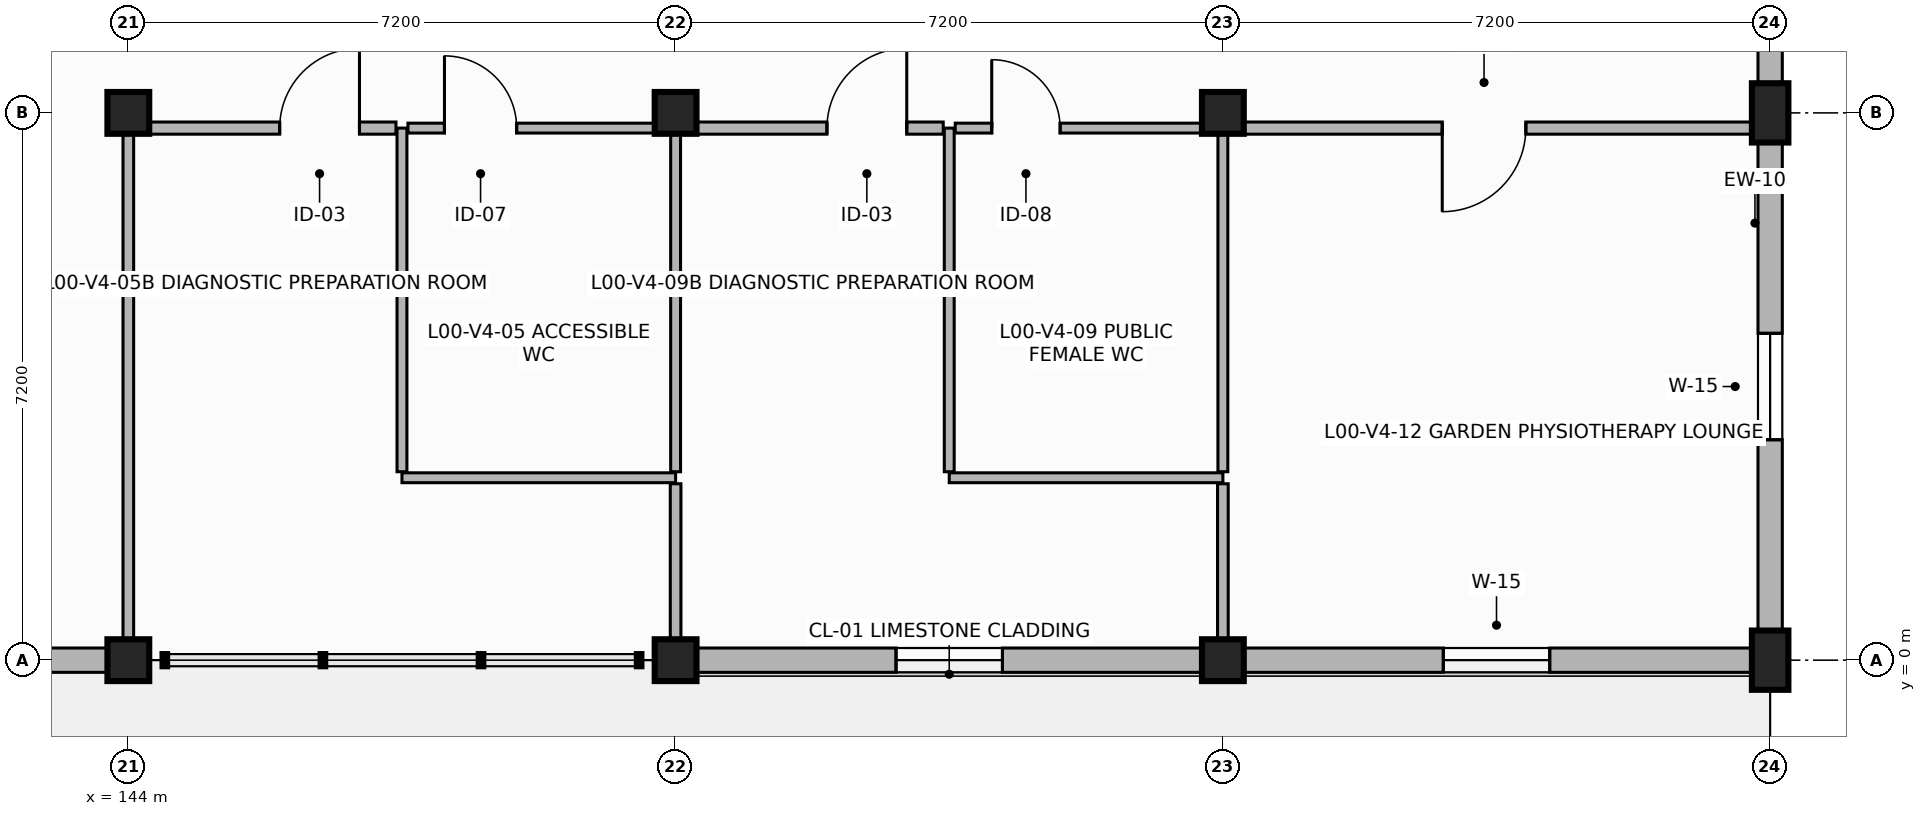
"""IFC4 building model, lengths in metres.
Left out: names, types, materials, properties, quantities, classifications, styles, units other than length and angle.
Written with IfcOpenShell. Run it as: python <this file> out.ifc"""

import sys

from ifc_helpers import new_model, si_unit, direction, frame, frame_2d, origin, origin_2d, place, context, subcontext, project, spatial, rectangle, extrude, element, fill, save


model = new_model("IFC4")
c1 = context("Model", 3, precision=1e-05, world=origin(), true_north=direction((0.0, 1.0)))
c2 = subcontext(c1, "Body", "Model", "MODEL_VIEW")
j1 = project(units=[si_unit("LENGTHUNIT", "METRE"), si_unit("PLANEANGLEUNIT", "RADIAN")], contexts=[c1])
p1 = place(None, origin())
s1 = spatial("IfcSite", under=j1, at=p1, CompositionType="ELEMENT")
p2 = place(p1, origin())
s2 = spatial("IfcBuilding", under=s1, at=p2, CompositionType="ELEMENT")
p3 = place(p2, origin())
s3 = spatial("IfcBuildingStorey", under=s2, at=p3, CompositionType="ELEMENT", Elevation=0.0)
for number, where, z_axis, x_axis in (
    (1, (144.0, 0.0, -0.35), (0.0, 0.0, 1.0), (1.0, 0.0, 0.0)),
    (2, (144.0, 7.2, -0.35), (0.0, 0.0, 1.0), (1.0, 0.0, 0.0)),
    (3, (151.2, 0.0, -0.35), (0.0, 0.0, 1.0), (1.0, 0.0, 0.0)),
    (4, (151.2, 7.2, -0.35), (0.0, 0.0, 1.0), (1.0, 0.0, 0.0)),
    (5, (158.4, 0.0, -0.35), (0.0, 0.0, 1.0), (1.0, 0.0, 0.0)),
    (6, (158.4, 7.2, -0.35), (0.0, 0.0, 1.0), (1.0, 0.0, 0.0)),
):
    element("IfcColumn", number, at=place(p3, frame(where, z_axis=z_axis, x_axis=x_axis)), inside=s3, PredefinedType="COLUMN", context=c2, shape_type="SweptSolid", body=[
        extrude(rectangle(XDim=0.55, YDim=0.55, at=origin_2d()), origin(), (0.0, 0.0, 1.0), 4.59),
    ])
for number, where, z_axis, x_axis in (
    (7, (165.6, 0.0, -0.35), (0.0, 0.0, 1.0), (1.0, 0.0, 0.0)),
    (8, (165.6, 7.2, -0.35), (0.0, 0.0, 1.0), (1.0, 0.0, 0.0)),
):
    element("IfcColumn", number, at=place(p3, frame(where, z_axis=z_axis, x_axis=x_axis)), inside=s3, PredefinedType="PILASTER", context=c2, shape_type="SweptSolid", body=[
        extrude(rectangle(XDim=0.48, YDim=0.78, at=origin_2d()), origin(), (0.0, 0.0, 1.0), 4.59),
    ])
p4 = place(p3, frame((136.8, 0.0, 0.0), z_axis=(0.0, 0.0, 1.0), x_axis=(1.0, 0.0, 0.0)))
e9 = element("IfcWall", 9, at=p4, inside=s3, PredefinedType="SOLIDWALL", context=c2, shape_type="SweptSolid", body=[
    extrude(rectangle(XDim=7.2, YDim=0.32, at=frame_2d((3.6, 0.0))), origin(), (0.0, 0.0, 1.0), 3.62),
])
p5 = place(p4, frame((2.5, 0.0, 0.0)))
e10 = element("IfcOpeningElement", 10, at=p5, cuts=e9, PredefinedType="OPENING", context=c2, shape_type="SweptSolid", body=[
    extrude(rectangle(XDim=2.2, YDim=2.6, at=frame_2d((1.1, 1.3))), frame((0.0, 0.17, 0.0), z_axis=(0.0, -1.0, 0.0), x_axis=(1.0, 0.0, 0.0)), (0.0, 0.0, 1.0), 0.34),
])
p6 = place(p3, frame((151.2, 0.0, 0.0), z_axis=(0.0, 0.0, 1.0), x_axis=(1.0, 0.0, 0.0)))
e11 = element("IfcWall", 11, at=p6, inside=s3, PredefinedType="SOLIDWALL", context=c2, shape_type="SweptSolid", body=[
    extrude(rectangle(XDim=7.2, YDim=0.32, at=frame_2d((3.6, 0.0))), origin(), (0.0, 0.0, 1.0), 3.62),
])
p7 = place(p6, frame((2.9, 0.0, 0.85)))
e12 = element("IfcOpeningElement", 12, at=p7, cuts=e11, PredefinedType="OPENING", context=c2, shape_type="SweptSolid", body=[
    extrude(rectangle(XDim=1.4, YDim=2.2, at=frame_2d((0.7, 1.1))), frame((0.0, 0.17, 0.0), z_axis=(0.0, -1.0, 0.0), x_axis=(1.0, 0.0, 0.0)), (0.0, 0.0, 1.0), 0.34),
])
p8 = place(p3, frame((158.4, 0.0, 0.0), z_axis=(0.0, 0.0, 1.0), x_axis=(1.0, 0.0, 0.0)))
e13 = element("IfcWall", 13, at=p8, inside=s3, PredefinedType="SOLIDWALL", context=c2, shape_type="SweptSolid", body=[
    extrude(rectangle(XDim=7.2, YDim=0.32, at=frame_2d((3.6, 0.0))), origin(), (0.0, 0.0, 1.0), 3.62),
])
p9 = place(p8, frame((2.9, 0.0, 0.85)))
e14 = element("IfcOpeningElement", 14, at=p9, cuts=e13, PredefinedType="OPENING", context=c2, shape_type="SweptSolid", body=[
    extrude(rectangle(XDim=1.4, YDim=2.2, at=frame_2d((0.7, 1.1))), frame((0.0, 0.17, 0.0), z_axis=(0.0, -1.0, 0.0), x_axis=(1.0, 0.0, 0.0)), (0.0, 0.0, 1.0), 0.34),
])
p10 = place(p3, frame((165.6, 0.0, 0.0), z_axis=(0.0, 0.0, 1.0), x_axis=(0.0, 1.0, 0.0)))
e15 = element("IfcWall", 15, at=p10, inside=s3, PredefinedType="SOLIDWALL", context=c2, shape_type="SweptSolid", body=[
    extrude(rectangle(XDim=7.2, YDim=0.32, at=frame_2d((3.6, 0.0))), origin(), (0.0, 0.0, 1.0), 3.62),
])
p11 = place(p10, frame((2.9, 0.0, 0.85)))
e16 = element("IfcOpeningElement", 16, at=p11, cuts=e15, PredefinedType="OPENING", context=c2, shape_type="SweptSolid", body=[
    extrude(rectangle(XDim=1.4, YDim=2.2, at=frame_2d((0.7, 1.1))), frame((0.0, 0.17, 0.0), z_axis=(0.0, -1.0, 0.0), x_axis=(1.0, 0.0, 0.0)), (0.0, 0.0, 1.0), 0.34),
])
p12 = place(p3, frame((165.6, 7.2, 0.0), z_axis=(0.0, 0.0, 1.0), x_axis=(0.0, 1.0, 0.0)))
e17 = element("IfcWall", 17, at=p12, inside=s3, PredefinedType="SOLIDWALL", context=c2, shape_type="SweptSolid", body=[
    extrude(rectangle(XDim=7.2, YDim=0.32, at=frame_2d((3.6, 0.0))), origin(), (0.0, 0.0, 1.0), 3.62),
])
p13 = place(p12, frame((4.4, 0.0, 0.85)))
e18 = element("IfcOpeningElement", 18, at=p13, cuts=e17, PredefinedType="OPENING", context=c2, shape_type="SweptSolid", body=[
    extrude(rectangle(XDim=1.4, YDim=2.2, at=frame_2d((0.7, 1.1))), frame((0.0, 0.17, 0.0), z_axis=(0.0, -1.0, 0.0), x_axis=(1.0, 0.0, 0.0)), (0.0, 0.0, 1.0), 0.34),
])
p14 = place(p3, frame((151.2, 2.4, 0.0), z_axis=(0.0, 0.0, 1.0), x_axis=(-1.0, 0.0, 0.0)))
e19 = element("IfcWall", 19, at=p14, inside=s3, PredefinedType="PARTITIONING", context=c2, shape_type="SweptSolid", body=[
    extrude(rectangle(XDim=3.6, YDim=0.13, at=frame_2d((1.8, 0.0))), origin(), (0.0, 0.0, 1.0), 3.6),
])
p15 = place(p3, frame((147.6, 2.479, 0.0), z_axis=(0.0, 0.0, 1.0), x_axis=(0.0, 1.0, 0.0)))
e20 = element("IfcWall", 20, at=p15, inside=s3, PredefinedType="PARTITIONING", context=c2, shape_type="SweptSolid", body=[
    extrude(rectangle(XDim=4.521, YDim=0.13, at=frame_2d((2.26, 0.0))), origin(), (0.0, 0.0, 1.0), 3.6),
])
p16 = place(p3, frame((147.679, 7.0, 0.0), z_axis=(0.0, 0.0, 1.0), x_axis=(1.0, 0.0, 0.0)))
e21 = element("IfcWall", 21, at=p16, inside=s3, PredefinedType="PARTITIONING", context=c2, shape_type="SweptSolid", body=[
    extrude(rectangle(XDim=3.521, YDim=0.13, at=frame_2d((1.76, 0.0))), origin(), (0.0, 0.0, 1.0), 3.6),
])
p17 = place(p16, frame((0.48, 0.0, 0.0)))
e22 = element("IfcOpeningElement", 22, at=p17, cuts=e21, PredefinedType="OPENING", context=c2, shape_type="SweptSolid", body=[
    extrude(rectangle(XDim=0.95, YDim=2.1, at=frame_2d((0.475, 1.05))), frame((0.0, 0.075, 0.0), z_axis=(0.0, -1.0, 0.0), x_axis=(1.0, 0.0, 0.0)), (0.0, 0.0, 1.0), 0.15),
])
p18 = place(p3, frame((151.2, 6.921, 0.0), z_axis=(0.0, 0.0, 1.0), x_axis=(0.0, -1.0, 0.0)))
e23 = element("IfcWall", 23, at=p18, inside=s3, PredefinedType="PARTITIONING", context=c2, shape_type="SweptSolid", body=[
    extrude(rectangle(XDim=4.442, YDim=0.13, at=frame_2d((2.221, 0.0))), origin(), (0.0, 0.0, 1.0), 3.6),
])
p19 = place(p3, frame((151.2, 2.321, 0.0), z_axis=(0.0, 0.0, 1.0), x_axis=(0.0, -1.0, 0.0)))
e24 = element("IfcWall", 24, at=p19, inside=s3, PredefinedType="PARTITIONING", context=c2, shape_type="SweptSolid", body=[
    extrude(rectangle(XDim=2.146, YDim=0.14, at=frame_2d((1.073, 0.0))), origin(), (0.0, 0.0, 1.0), 3.6),
])
p20 = place(p3, frame((144.0, 0.175, 0.0), z_axis=(0.0, 0.0, 1.0), x_axis=(0.0, 1.0, 0.0)))
e25 = element("IfcWall", 25, at=p20, inside=s3, PredefinedType="PARTITIONING", context=c2, shape_type="SweptSolid", body=[
    extrude(rectangle(XDim=6.825, YDim=0.14, at=frame_2d((3.413, 0.0))), origin(), (0.0, 0.0, 1.0), 3.6),
])
p21 = place(p3, frame((144.084, 7.0, 0.0), z_axis=(0.0, 0.0, 1.0), x_axis=(1.0, 0.0, 0.0)))
e26 = element("IfcWall", 26, at=p21, inside=s3, PredefinedType="PARTITIONING", context=c2, shape_type="SweptSolid", body=[
    extrude(rectangle(XDim=3.437, YDim=0.16, at=frame_2d((1.719, 0.0))), origin(), (0.0, 0.0, 1.0), 3.6),
])
p22 = place(p21, frame((1.907, 0.0, 0.0)))
e27 = element("IfcOpeningElement", 27, at=p22, cuts=e26, PredefinedType="OPENING", context=c2, shape_type="SweptSolid", body=[
    extrude(rectangle(XDim=1.05, YDim=2.15, at=frame_2d((0.525, 1.075))), frame((0.0, 0.09, 0.0), z_axis=(0.0, -1.0, 0.0), x_axis=(1.0, 0.0, 0.0)), (0.0, 0.0, 1.0), 0.18),
])
p23 = place(p3, frame((158.4, 2.4, 0.0), z_axis=(0.0, 0.0, 1.0), x_axis=(-1.0, 0.0, 0.0)))
e28 = element("IfcWall", 28, at=p23, inside=s3, PredefinedType="PARTITIONING", context=c2, shape_type="SweptSolid", body=[
    extrude(rectangle(XDim=3.6, YDim=0.13, at=frame_2d((1.8, 0.0))), origin(), (0.0, 0.0, 1.0), 3.6),
])
p24 = place(p3, frame((154.8, 2.479, 0.0), z_axis=(0.0, 0.0, 1.0), x_axis=(0.0, 1.0, 0.0)))
e29 = element("IfcWall", 29, at=p24, inside=s3, PredefinedType="PARTITIONING", context=c2, shape_type="SweptSolid", body=[
    extrude(rectangle(XDim=4.521, YDim=0.13, at=frame_2d((2.26, 0.0))), origin(), (0.0, 0.0, 1.0), 3.6),
])
p25 = place(p3, frame((154.879, 7.0, 0.0), z_axis=(0.0, 0.0, 1.0), x_axis=(1.0, 0.0, 0.0)))
e30 = element("IfcWall", 30, at=p25, inside=s3, PredefinedType="PARTITIONING", context=c2, shape_type="SweptSolid", body=[
    extrude(rectangle(XDim=3.521, YDim=0.13, at=frame_2d((1.76, 0.0))), origin(), (0.0, 0.0, 1.0), 3.6),
])
p26 = place(p25, frame((0.48, 0.0, 0.0)))
e31 = element("IfcOpeningElement", 31, at=p26, cuts=e30, PredefinedType="OPENING", context=c2, shape_type="SweptSolid", body=[
    extrude(rectangle(XDim=0.9, YDim=2.1, at=frame_2d((0.45, 1.05))), frame((0.0, 0.075, 0.0), z_axis=(0.0, -1.0, 0.0), x_axis=(1.0, 0.0, 0.0)), (0.0, 0.0, 1.0), 0.15),
])
p27 = place(p3, frame((158.4, 6.921, 0.0), z_axis=(0.0, 0.0, 1.0), x_axis=(0.0, -1.0, 0.0)))
e32 = element("IfcWall", 32, at=p27, inside=s3, PredefinedType="PARTITIONING", context=c2, shape_type="SweptSolid", body=[
    extrude(rectangle(XDim=4.442, YDim=0.13, at=frame_2d((2.221, 0.0))), origin(), (0.0, 0.0, 1.0), 3.6),
])
p28 = place(p3, frame((158.4, 2.321, 0.0), z_axis=(0.0, 0.0, 1.0), x_axis=(0.0, -1.0, 0.0)))
e33 = element("IfcWall", 33, at=p28, inside=s3, PredefinedType="PARTITIONING", context=c2, shape_type="SweptSolid", body=[
    extrude(rectangle(XDim=2.146, YDim=0.14, at=frame_2d((1.073, 0.0))), origin(), (0.0, 0.0, 1.0), 3.6),
])
p29 = place(p3, frame((151.279, 7.0, 0.0), z_axis=(0.0, 0.0, 1.0), x_axis=(1.0, 0.0, 0.0)))
e34 = element("IfcWall", 34, at=p29, inside=s3, PredefinedType="PARTITIONING", context=c2, shape_type="SweptSolid", body=[
    extrude(rectangle(XDim=3.442, YDim=0.16, at=frame_2d((1.721, 0.0))), origin(), (0.0, 0.0, 1.0), 3.6),
])
p30 = place(p29, frame((1.912, 0.0, 0.0)))
e35 = element("IfcOpeningElement", 35, at=p30, cuts=e34, PredefinedType="OPENING", context=c2, shape_type="SweptSolid", body=[
    extrude(rectangle(XDim=1.05, YDim=2.15, at=frame_2d((0.525, 1.075))), frame((0.0, 0.09, 0.0), z_axis=(0.0, -1.0, 0.0), x_axis=(1.0, 0.0, 0.0)), (0.0, 0.0, 1.0), 0.18),
])
p31 = place(p3, frame((158.479, 7.0, 0.0), z_axis=(0.0, 0.0, 1.0), x_axis=(1.0, 0.0, 0.0)))
e36 = element("IfcWall", 36, at=p31, inside=s3, PredefinedType="PARTITIONING", context=c2, shape_type="SweptSolid", body=[
    extrude(rectangle(XDim=6.946, YDim=0.16, at=frame_2d((3.473, 0.0))), origin(), (0.0, 0.0, 1.0), 3.6),
])
p32 = place(p31, frame((2.807, 0.0, 0.0)))
e37 = element("IfcOpeningElement", 37, at=p32, cuts=e36, PredefinedType="OPENING", context=c2, shape_type="SweptSolid", body=[
    extrude(rectangle(XDim=1.1, YDim=2.2, at=frame_2d((0.55, 1.1))), frame((0.0, 0.09, 0.0), z_axis=(0.0, -1.0, 0.0), x_axis=(1.0, 0.0, 0.0)), (0.0, 0.0, 1.0), 0.18),
])
p33 = place(p7, origin())
e38 = element("IfcWindow", 38, at=p33, inside=s3, PartitioningType="SINGLE_PANEL", PredefinedType="WINDOW", context=c2, shape_type="SweptSolid", body=[
    extrude(rectangle(XDim=1.4, YDim=2.2, at=frame_2d((0.7, 1.1))), frame((0.0, 0.03, 0.0), z_axis=(0.0, -1.0, 0.0), x_axis=(1.0, 0.0, 0.0)), (0.0, 0.0, 1.0), 0.06),
])
fill(e12, e38)
p34 = place(p9, origin())
e39 = element("IfcWindow", 39, at=p34, inside=s3, PartitioningType="SINGLE_PANEL", PredefinedType="WINDOW", context=c2, shape_type="SweptSolid", body=[
    extrude(rectangle(XDim=1.4, YDim=2.2, at=frame_2d((0.7, 1.1))), frame((0.0, 0.03, 0.0), z_axis=(0.0, -1.0, 0.0), x_axis=(1.0, 0.0, 0.0)), (0.0, 0.0, 1.0), 0.06),
])
fill(e14, e39)
p35 = place(p11, origin())
e40 = element("IfcWindow", 40, at=p35, inside=s3, PartitioningType="SINGLE_PANEL", PredefinedType="WINDOW", context=c2, shape_type="SweptSolid", body=[
    extrude(rectangle(XDim=1.4, YDim=2.2, at=frame_2d((0.7, 1.1))), frame((0.0, 0.03, 0.0), z_axis=(0.0, -1.0, 0.0), x_axis=(1.0, 0.0, 0.0)), (0.0, 0.0, 1.0), 0.06),
])
fill(e16, e40)
p36 = place(p17, origin())
e41 = element("IfcDoor", 41, at=p36, inside=s3, OperationType="SINGLE_SWING_LEFT", PredefinedType="DOOR", context=c2, shape_type="SweptSolid", body=[
    extrude(rectangle(XDim=0.95, YDim=2.1, at=frame_2d((0.475, 1.05))), frame((0.0, 0.025, 0.0), z_axis=(0.0, -1.0, 0.0), x_axis=(1.0, 0.0, 0.0)), (0.0, 0.0, 1.0), 0.05),
])
fill(e22, e41)
p37 = place(p22, origin())
e42 = element("IfcDoor", 42, at=p37, inside=s3, OperationType="SINGLE_SWING_RIGHT", PredefinedType="DOOR", context=c2, shape_type="SweptSolid", body=[
    extrude(rectangle(XDim=1.05, YDim=2.15, at=frame_2d((0.525, 1.075))), frame((0.0, 0.025, 0.0), z_axis=(0.0, -1.0, 0.0), x_axis=(1.0, 0.0, 0.0)), (0.0, 0.0, 1.0), 0.05),
])
fill(e27, e42)
p38 = place(p26, origin())
e43 = element("IfcDoor", 43, at=p38, inside=s3, OperationType="SINGLE_SWING_LEFT", PredefinedType="DOOR", context=c2, shape_type="SweptSolid", body=[
    extrude(rectangle(XDim=0.9, YDim=2.1, at=frame_2d((0.45, 1.05))), frame((0.0, 0.025, 0.0), z_axis=(0.0, -1.0, 0.0), x_axis=(1.0, 0.0, 0.0)), (0.0, 0.0, 1.0), 0.05),
])
fill(e31, e43)
p39 = place(p30, origin())
e44 = element("IfcDoor", 44, at=p39, inside=s3, OperationType="SINGLE_SWING_RIGHT", PredefinedType="DOOR", context=c2, shape_type="SweptSolid", body=[
    extrude(rectangle(XDim=1.05, YDim=2.15, at=frame_2d((0.525, 1.075))), frame((0.0, 0.025, 0.0), z_axis=(0.0, -1.0, 0.0), x_axis=(1.0, 0.0, 0.0)), (0.0, 0.0, 1.0), 0.05),
])
fill(e35, e44)
p40 = place(p32, frame((1.1, 0.0, 0.0), z_axis=(0.0, 0.0, 1.0), x_axis=(-1.0, 0.0, 0.0)))
e45 = element("IfcDoor", 45, at=p40, inside=s3, OperationType="SINGLE_SWING_RIGHT", PredefinedType="DOOR", context=c2, shape_type="SweptSolid", body=[
    extrude(rectangle(XDim=1.1, YDim=2.2, at=frame_2d((0.55, 1.1))), frame((0.0, 0.025, 0.0), z_axis=(0.0, -1.0, 0.0), x_axis=(1.0, 0.0, 0.0)), (0.0, 0.0, 1.0), 0.05),
])
fill(e37, e45)
save(model, sys.argv[1])
